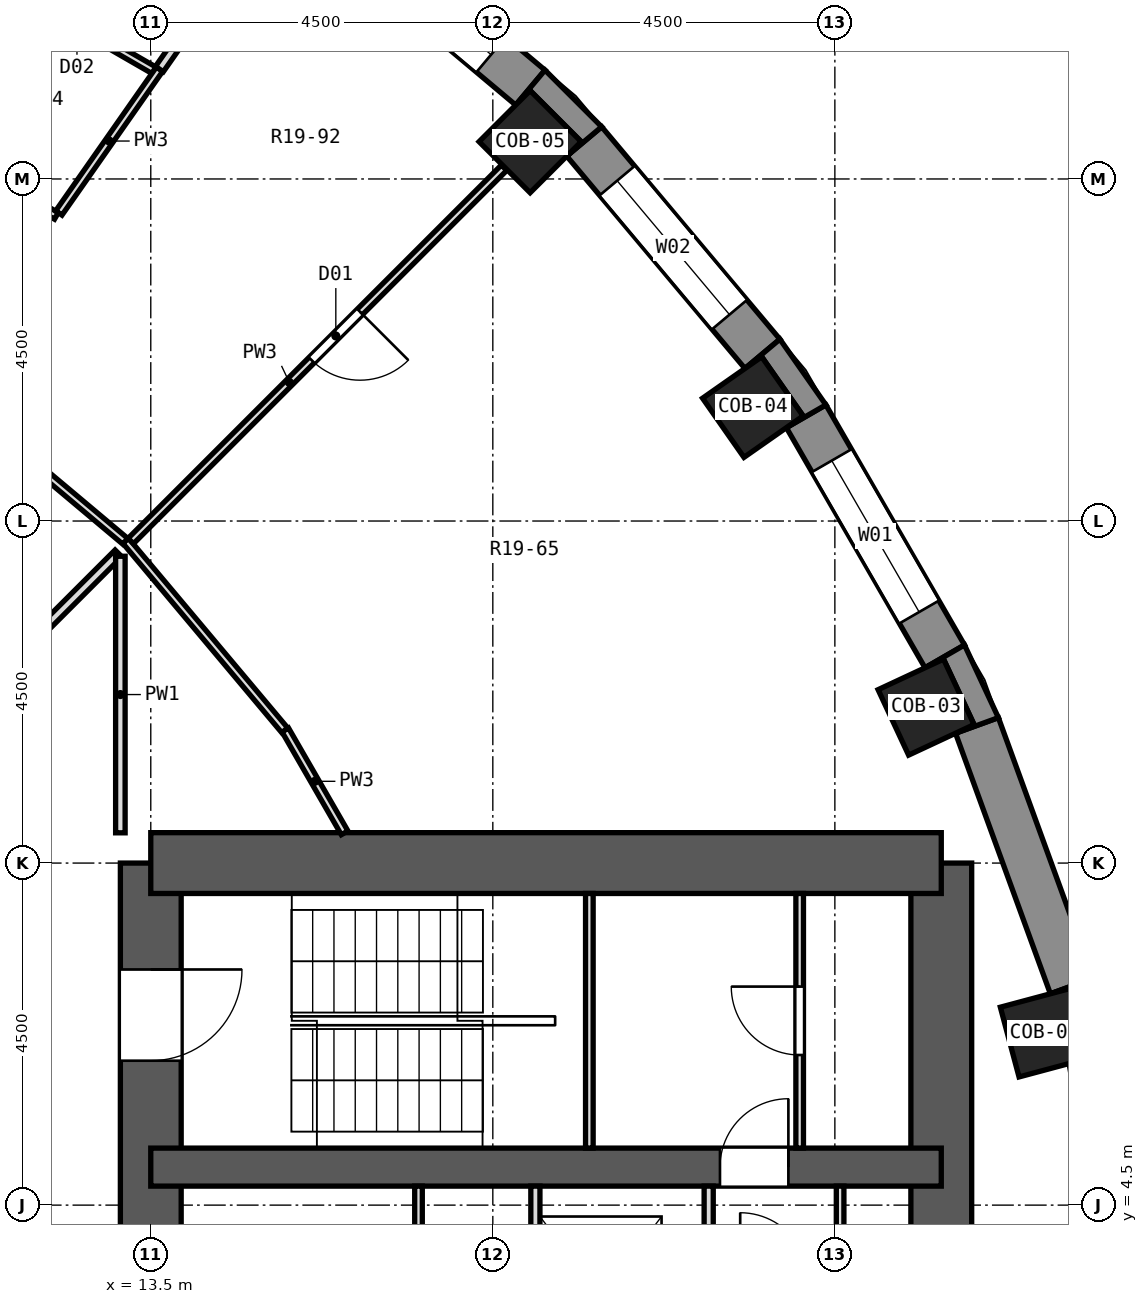
"""IFC4 building model, lengths in metres.
Left out: names, types, materials, properties, quantities, classifications, styles, units other than length and angle.
Written with IfcOpenShell. Run it as: python <this file> out.ifc"""

import sys

from ifc_helpers import new_model, si_unit, direction, frame, frame_2d, origin, origin_2d, place, context, subcontext, project, spatial, polyline, rectangle, outline, extrude, element, fill, save


model = new_model("IFC4")
c1 = context("Model", 3, precision=1e-05, world=origin(), true_north=direction((0.0, 1.0)))
c2 = subcontext(c1, "Body", "Model", "MODEL_VIEW")
j1 = project(units=[si_unit("LENGTHUNIT", "METRE"), si_unit("PLANEANGLEUNIT", "RADIAN")], contexts=[c1])
p1 = place(None, origin())
s1 = spatial("IfcSite", under=j1, at=p1, CompositionType="ELEMENT")
p2 = place(p1, origin())
s2 = spatial("IfcBuilding", under=s1, at=p2, CompositionType="ELEMENT")
p3 = place(p2, frame((0.0, 0.0, 111.7)))
s3 = spatial("IfcBuildingStorey", under=s2, at=p3, CompositionType="ELEMENT", Elevation=111.7)
for number, where, z_axis, x_axis in (
    (1, (25.259, 6.768, 0.0), (0.0, 0.0, 1.0), (0.966, 0.259, 0.0)),
    (2, (23.7, 11.052, 0.0), (0.0, 0.0, 1.0), (0.906, 0.423, 0.0)),
    (3, (21.421, 14.999, 0.0), (0.0, 0.0, 1.0), (0.819, 0.574, 0.0)),
    (4, (18.491, 18.491, 0.0), (0.0, 0.0, 1.0), (0.707, 0.707, 0.0)),
):
    element("IfcColumn", number, at=place(p3, frame(where, z_axis=z_axis, x_axis=x_axis)), inside=s3, PredefinedType="COLUMN", context=c2, shape_type="SweptSolid", body=[
        extrude(rectangle(XDim=0.95, YDim=0.95, at=origin_2d()), origin(), (0.0, 0.0, 1.0), 3.3),
    ])
p4 = place(p3, frame((13.5, -9.0, 0.0), z_axis=(0.0, 0.0, 1.0), x_axis=(0.0, 1.0, 0.0)))
e5 = element("IfcWall", 5, at=p4, inside=s3, PredefinedType="SHEAR", context=c2, shape_type="SweptSolid", body=[
    extrude(rectangle(XDim=18.0, YDim=0.8, at=frame_2d((9.0, 0.0))), origin(), (0.0, 0.0, 1.0), 3.3),
])
p5 = place(p4, frame((15.4, 0.0, 0.0)))
e6 = element("IfcOpeningElement", 6, at=p5, cuts=e5, PredefinedType="OPENING", context=c2, shape_type="SweptSolid", body=[
    extrude(rectangle(XDim=1.2, YDim=2.1, at=frame_2d((0.6, 1.05))), frame((0.0, 0.412, 0.0), z_axis=(0.0, -1.0, 0.0), x_axis=(1.0, 0.0, 0.0)), (0.0, 0.0, 1.0), 0.824),
])
p6 = place(p4, frame((1.4, 0.0, 0.0)))
e7 = element("IfcOpeningElement", 7, at=p6, cuts=e5, PredefinedType="OPENING", context=c2, shape_type="SweptSolid", body=[
    extrude(rectangle(XDim=1.2, YDim=2.1, at=frame_2d((0.6, 1.05))), frame((0.0, 0.412, 0.0), z_axis=(0.0, -1.0, 0.0), x_axis=(1.0, 0.0, 0.0)), (0.0, 0.0, 1.0), 0.824),
])
p7 = place(p4, frame((7.5, 0.0, 0.0)))
e8 = element("IfcOpeningElement", 8, at=p7, cuts=e5, PredefinedType="OPENING", context=c2, shape_type="SweptSolid", body=[
    extrude(rectangle(XDim=3.0, YDim=2.4, at=frame_2d((1.5, 1.2))), frame((0.0, 0.412, 0.0), z_axis=(0.0, -1.0, 0.0), x_axis=(1.0, 0.0, 0.0)), (0.0, 0.0, 1.0), 0.824),
])
p8 = place(p3, frame((23.9, -9.0, 0.0), z_axis=(0.0, 0.0, 1.0), x_axis=(0.0, 1.0, 0.0)))
e9 = element("IfcWall", 9, at=p8, inside=s3, PredefinedType="SHEAR", context=c2, shape_type="SweptSolid", body=[
    extrude(rectangle(XDim=18.0, YDim=0.8, at=frame_2d((9.0, 0.0))), origin(), (0.0, 0.0, 1.0), 3.3),
])
p9 = place(p3, frame((13.5, 9.0, 0.0), z_axis=(0.0, 0.0, 1.0), x_axis=(1.0, 0.0, 0.0)))
e10 = element("IfcWall", 10, at=p9, inside=s3, PredefinedType="SHEAR", context=c2, shape_type="SweptSolid", body=[
    extrude(rectangle(XDim=10.4, YDim=0.8, at=frame_2d((5.2, 0.0))), origin(), (0.0, 0.0, 1.0), 3.3),
])
p10 = place(p3, frame((13.5, 5.0, 0.0), z_axis=(0.0, 0.0, 1.0), x_axis=(1.0, 0.0, 0.0)))
e11 = element("IfcWall", 11, at=p10, inside=s3, PredefinedType="SHEAR", context=c2, shape_type="SweptSolid", body=[
    extrude(rectangle(XDim=10.4, YDim=0.5, at=frame_2d((5.2, 0.0))), origin(), (0.0, 0.0, 1.0), 3.3),
])
p11 = place(p10, frame((7.489, 0.0, 0.0)))
e12 = element("IfcOpeningElement", 12, at=p11, cuts=e11, PredefinedType="OPENING", context=c2, shape_type="SweptSolid", body=[
    extrude(rectangle(XDim=0.9, YDim=2.1, at=frame_2d((0.45, 1.05))), frame((0.0, 0.262, 0.0), z_axis=(0.0, -1.0, 0.0), x_axis=(1.0, 0.0, 0.0)), (0.0, 0.0, 1.0), 0.524),
])
p12 = place(p3, frame((25.617, 7.383, 0.0), z_axis=(0.0, 0.0, 1.0), x_axis=(-0.341990236633, 0.939703505393, 0.0)))
e13 = element("IfcWall", 13, at=p12, inside=s3, PredefinedType="SOLIDWALL", context=c2, shape_type="SweptSolid", body=[
    extrude(rectangle(XDim=3.648, YDim=0.6, at=frame_2d((1.824, 0.0))), origin(), (0.0, 0.0, 1.0), 2.8),
])
p13 = place(p3, frame((23.946, 11.719, 0.0), z_axis=(0.0, 0.0, 1.0), x_axis=(-0.499954196102, 0.866051847062, 0.0)))
e14 = element("IfcWall", 14, at=p13, inside=s3, PredefinedType="SOLIDWALL", context=c2, shape_type="SweptSolid", body=[
    extrude(rectangle(XDim=3.648, YDim=0.6, at=frame_2d((1.824, 0.0))), origin(), (0.0, 0.0, 1.0), 2.8),
])
p14 = place(p13, frame((0.674, 0.0, 0.9)))
e15 = element("IfcOpeningElement", 15, at=p14, cuts=e14, PredefinedType="OPENING", context=c2, shape_type="SweptSolid", body=[
    extrude(rectangle(XDim=2.3, YDim=1.8, at=frame_2d((1.15, 0.9))), frame((0.0, 0.312, 0.0), z_axis=(0.0, -1.0, 0.0), x_axis=(1.0, 0.0, 0.0)), (0.0, 0.0, 1.0), 0.624),
])
p15 = place(p3, frame((21.547, 15.699, 0.0), z_axis=(0.0, 0.0, 1.0), x_axis=(-0.642774476932, 0.766055462616, 0.0)))
e16 = element("IfcWall", 16, at=p15, inside=s3, PredefinedType="SOLIDWALL", context=c2, shape_type="SweptSolid", body=[
    extrude(rectangle(XDim=3.648, YDim=0.6, at=frame_2d((1.824, 0.0))), origin(), (0.0, 0.0, 1.0), 2.8),
])
p16 = place(p15, frame((0.674, 0.0, 0.9)))
e17 = element("IfcOpeningElement", 17, at=p16, cuts=e16, PredefinedType="OPENING", context=c2, shape_type="SweptSolid", body=[
    extrude(rectangle(XDim=2.3, YDim=1.8, at=frame_2d((1.15, 0.9))), frame((0.0, 0.312, 0.0), z_axis=(0.0, -1.0, 0.0), x_axis=(1.0, 0.0, 0.0)), (0.0, 0.0, 1.0), 0.624),
])
p17 = place(p3, frame((18.494, 19.202, 0.0), z_axis=(0.0, 0.0, 1.0), x_axis=(-0.766055462616, 0.642774476932, 0.0)))
e18 = element("IfcWall", 18, at=p17, inside=s3, PredefinedType="SOLIDWALL", context=c2, shape_type="SweptSolid", body=[
    extrude(rectangle(XDim=3.648, YDim=0.6, at=frame_2d((1.824, 0.0))), origin(), (0.0, 0.0, 1.0), 2.8),
])
p18 = place(p17, frame((0.674, 0.0, 0.9)))
e19 = element("IfcOpeningElement", 19, at=p18, cuts=e18, PredefinedType="OPENING", context=c2, shape_type="SweptSolid", body=[
    extrude(rectangle(XDim=2.3, YDim=1.8, at=frame_2d((1.15, 0.9))), frame((0.0, 0.312, 0.0), z_axis=(0.0, -1.0, 0.0), x_axis=(1.0, 0.0, 0.0)), (0.0, 0.0, 1.0), 0.624),
])
p19 = place(p3, origin())
e20 = element("IfcWall", 20, at=p19, inside=s3, PredefinedType="SOLIDWALL", context=c2, shape_type="SweptSolid", body=[
    extrude(outline(polyline([(26.172, 6.467), (25.899, 7.486), (25.335, 7.28), (25.595, 7.35), (25.841, 6.432), (25.581, 6.363), (26.172, 6.467)])), origin(), (0.0, 0.0, 1.0), 2.8),
])
p20 = place(p3, origin())
e21 = element("IfcWall", 21, at=p20, inside=s3, PredefinedType="SOLIDWALL", context=c2, shape_type="SweptSolid", body=[
    extrude(outline(polyline([(24.651, 10.913), (24.206, 11.869), (23.686, 11.569), (23.93, 11.683), (24.331, 10.822), (24.087, 10.708), (24.651, 10.913)])), origin(), (0.0, 0.0, 1.0), 2.8),
])
p21 = place(p3, origin())
e22 = element("IfcWall", 22, at=p21, inside=s3, PredefinedType="SOLIDWALL", context=c2, shape_type="SweptSolid", body=[
    extrude(outline(polyline([(21.777, 15.892), (21.317, 15.506), (21.538, 15.661), (22.083, 14.882), (21.862, 14.728), (22.382, 15.028), (21.777, 15.892)])), origin(), (0.0, 0.0, 1.0), 2.8),
])
p22 = place(p3, origin())
e23 = element("IfcWall", 23, at=p22, inside=s3, PredefinedType="SOLIDWALL", context=c2, shape_type="SweptSolid", body=[
    extrude(outline(polyline([(19.432, 18.686), (18.686, 19.432), (18.301, 18.972), (18.491, 19.163), (19.163, 18.491), (18.972, 18.301), (19.432, 18.686)])), origin(), (0.0, 0.0, 1.0), 2.8),
])
p23 = place(p3, frame((15.269, 10.753, 0.0), z_axis=(0.0, 0.0, 1.0), x_axis=(0.499614353746, -0.866247942296, 0.0)))
e24 = element("IfcWall", 24, at=p23, inside=s3, PredefinedType="PARTITIONING", context=c2, shape_type="SweptSolid", body=[
    extrude(rectangle(XDim=1.564, YDim=0.1, at=frame_2d((0.782, 0.0))), origin(), (0.0, 0.0, 1.0), 2.8),
])
for number, where, z_axis, x_axis in (
    (25, (13.169, 13.241, 0.0), (0.0, 0.0, 1.0), (0.643, -0.766, 0.0)),
    (26, (10.67, 15.327, 0.0), (0.0, 0.0, 1.0), (0.766, -0.643, 0.0)),
):
    element("IfcWall", number, at=place(p3, frame(where, z_axis=z_axis, x_axis=x_axis)), inside=s3, PredefinedType="PARTITIONING", context=c2, shape_type="SweptSolid", body=[
        extrude(rectangle(XDim=3.255, YDim=0.1, at=frame_2d((1.628, 0.0))), origin(), (0.0, 0.0, 1.0), 2.8),
    ])
p24 = place(p3, frame((10.31, 18.64, 0.0), z_axis=(0.0, 0.0, 1.0), x_axis=(0.865856719536, -0.500292055938, 0.0)))
e27 = element("IfcWall", 27, at=p24, inside=s3, PredefinedType="PARTITIONING", context=c2, shape_type="SweptSolid", body=[
    extrude(rectangle(XDim=2.251, YDim=0.1, at=frame_2d((1.125, 0.0))), origin(), (0.0, 0.0, 1.0), 2.8),
])
p25 = place(p3, frame((11.471, 20.625, 0.0), z_axis=(0.0, 0.0, 1.0), x_axis=(0.866161784063, -0.499763707994, 0.0)))
e28 = element("IfcWall", 28, at=p25, inside=s3, PredefinedType="PARTITIONING", context=c2, shape_type="SweptSolid", body=[
    extrude(rectangle(XDim=2.391, YDim=0.1, at=frame_2d((1.195, 0.0))), origin(), (0.0, 0.0, 1.0), 2.8),
])
p26 = place(p25, frame((0.822, 0.0, 0.0)))
e29 = element("IfcOpeningElement", 29, at=p26, cuts=e28, PredefinedType="OPENING", context=c2, shape_type="SweptSolid", body=[
    extrude(rectangle(XDim=0.8, YDim=2.1, at=frame_2d((0.4, 1.05))), frame((0.0, 0.062, 0.0), z_axis=(0.0, -1.0, 0.0), x_axis=(1.0, 0.0, 0.0)), (0.0, 0.0, 1.0), 0.124),
])
p27 = place(p3, frame((13.237, 13.237, 0.0), z_axis=(0.0, 0.0, 1.0), x_axis=(0.707106781187, 0.707106781187, 0.0)))
e30 = element("IfcWall", 30, at=p27, inside=s3, PredefinedType="PARTITIONING", context=c2, shape_type="SweptSolid", body=[
    extrude(rectangle(XDim=6.945, YDim=0.1, at=frame_2d((3.472, 0.0))), origin(), (0.0, 0.0, 1.0), 2.8),
])
p28 = place(p27, frame((3.364, 0.0, 0.0)))
e31 = element("IfcOpeningElement", 31, at=p28, cuts=e30, PredefinedType="OPENING", context=c2, shape_type="SweptSolid", body=[
    extrude(rectangle(XDim=0.9, YDim=2.1, at=frame_2d((0.45, 1.05))), frame((0.0, 0.062, 0.0), z_axis=(0.0, -1.0, 0.0), x_axis=(1.0, 0.0, 0.0)), (0.0, 0.0, 1.0), 0.124),
])
p29 = place(p3, frame((7.71, 7.71, 0.0), z_axis=(0.0, 0.0, 1.0), x_axis=(0.707106781187, 0.707106781187, 0.0)))
e32 = element("IfcWall", 32, at=p29, inside=s3, PredefinedType="PARTITIONING", context=c2, shape_type="SweptSolid", body=[
    extrude(rectangle(XDim=7.587, YDim=0.125, at=frame_2d((3.793, 0.0))), origin(), (0.0, 0.0, 1.0), 2.8),
])
p30 = place(p3, frame((12.291, 17.553, 0.0), z_axis=(0.0, 0.0, 1.0), x_axis=(0.573582946976, 0.819147485462, 0.0)))
e33 = element("IfcWall", 33, at=p30, inside=s3, PredefinedType="PARTITIONING", context=c2, shape_type="SweptSolid", body=[
    extrude(rectangle(XDim=2.31, YDim=0.1, at=frame_2d((1.155, 0.0))), origin(), (0.0, 0.0, 1.0), 2.8),
])
p31 = place(p3, frame((13.614, 19.446, 0.0), z_axis=(0.0, 0.0, 1.0), x_axis=(0.573470846205, 0.819225969164, 0.0)))
e34 = element("IfcWall", 34, at=p31, inside=s3, PredefinedType="PARTITIONING", context=c2, shape_type="SweptSolid", body=[
    extrude(rectangle(XDim=1.927, YDim=0.125, at=frame_2d((0.964, 0.0))), origin(), (0.0, 0.0, 1.0), 2.8),
])
p32 = place(p3, frame((13.1, 9.398, 0.0), z_axis=(0.0, 0.0, 1.0), x_axis=(0.0, 1.0, 0.0)))
e35 = element("IfcWall", 35, at=p32, inside=s3, PredefinedType="PARTITIONING", context=c2, shape_type="SweptSolid", body=[
    extrude(rectangle(XDim=3.639, YDim=0.125, at=frame_2d((1.819, 0.0))), origin(), (0.0, 0.0, 1.0), 2.8),
])
p33 = place(p3, frame((17.022, 2.25, 0.0), z_axis=(0.0, 0.0, 1.0), x_axis=(0.0, 1.0, 0.0)))
e36 = element("IfcWall", 36, at=p33, inside=s3, PredefinedType="PARTITIONING", context=c2, shape_type="SweptSolid", body=[
    extrude(rectangle(XDim=2.5, YDim=0.1, at=frame_2d((1.25, 0.0))), origin(), (0.0, 0.0, 1.0), 2.8),
])
for number, where, z_axis, x_axis in (
    (37, (18.56, 2.25, 0.0), (0.0, 0.0, 1.0), (0.0, 1.0, 0.0)),
    (38, (20.84, 2.25, 0.0), (0.0, 0.0, 1.0), (0.0, 1.0, 0.0)),
):
    element("IfcWall", number, at=place(p3, frame(where, z_axis=z_axis, x_axis=x_axis)), inside=s3, PredefinedType="PARTITIONING", context=c2, shape_type="SweptSolid", body=[
        extrude(rectangle(XDim=2.5, YDim=0.12, at=frame_2d((1.25, 0.0))), origin(), (0.0, 0.0, 1.0), 2.8),
    ])
p34 = place(p3, frame((22.569, 2.25, 0.0), z_axis=(0.0, 0.0, 1.0), x_axis=(0.0, 1.0, 0.0)))
e39 = element("IfcWall", 39, at=p34, inside=s3, PredefinedType="PARTITIONING", context=c2, shape_type="SweptSolid", body=[
    extrude(rectangle(XDim=2.5, YDim=0.1, at=frame_2d((1.25, 0.0))), origin(), (0.0, 0.0, 1.0), 2.8),
])
p35 = place(p3, frame((19.27, 5.25, 0.0), z_axis=(0.0, 0.0, 1.0), x_axis=(0.0, 1.0, 0.0)))
e40 = element("IfcWall", 40, at=p35, inside=s3, PredefinedType="PARTITIONING", context=c2, shape_type="SweptSolid", body=[
    extrude(rectangle(XDim=3.35, YDim=0.1, at=frame_2d((1.675, 0.0))), origin(), (0.0, 0.0, 1.0), 2.8),
])
p36 = place(p3, frame((22.037, 5.25, 0.0), z_axis=(0.0, 0.0, 1.0), x_axis=(0.0, 1.0, 0.0)))
e41 = element("IfcWall", 41, at=p36, inside=s3, PredefinedType="PARTITIONING", context=c2, shape_type="SweptSolid", body=[
    extrude(rectangle(XDim=3.35, YDim=0.1, at=frame_2d((1.675, 0.0))), origin(), (0.0, 0.0, 1.0), 2.8),
])
p37 = place(p36, frame((1.225, 0.0, 0.0)))
e42 = element("IfcOpeningElement", 42, at=p37, cuts=e41, PredefinedType="OPENING", context=c2, shape_type="SweptSolid", body=[
    extrude(rectangle(XDim=0.9, YDim=2.1, at=frame_2d((0.45, 1.05))), frame((0.0, 0.062, 0.0), z_axis=(0.0, -1.0, 0.0), x_axis=(1.0, 0.0, 0.0)), (0.0, 0.0, 1.0), 0.124),
])
p38 = place(p14, origin())
e43 = element("IfcWindow", 43, at=p38, inside=s3, PartitioningType="SINGLE_PANEL", PredefinedType="WINDOW", context=c2, shape_type="SweptSolid", body=[
    extrude(rectangle(XDim=2.3, YDim=1.8, at=frame_2d((1.15, 0.9))), frame((0.0, 0.18, 0.0), z_axis=(0.0, -1.0, 0.0), x_axis=(1.0, 0.0, 0.0)), (0.0, 0.0, 1.0), 0.06),
])
fill(e15, e43)
p39 = place(p16, origin())
e44 = element("IfcWindow", 44, at=p39, inside=s3, PartitioningType="SINGLE_PANEL", PredefinedType="WINDOW", context=c2, shape_type="SweptSolid", body=[
    extrude(rectangle(XDim=2.3, YDim=1.8, at=frame_2d((1.15, 0.9))), frame((0.0, 0.18, 0.0), z_axis=(0.0, -1.0, 0.0), x_axis=(1.0, 0.0, 0.0)), (0.0, 0.0, 1.0), 0.06),
])
fill(e17, e44)
p40 = place(p18, origin())
e45 = element("IfcWindow", 45, at=p40, inside=s3, PartitioningType="SINGLE_PANEL", PredefinedType="WINDOW", context=c2, shape_type="SweptSolid", body=[
    extrude(rectangle(XDim=2.3, YDim=1.8, at=frame_2d((1.15, 0.9))), frame((0.0, 0.18, 0.0), z_axis=(0.0, -1.0, 0.0), x_axis=(1.0, 0.0, 0.0)), (0.0, 0.0, 1.0), 0.06),
])
fill(e19, e45)
p41 = place(p28, frame((0.9, 0.0, 0.0), z_axis=(0.0, 0.0, 1.0), x_axis=(-1.0, 0.0, 0.0)))
e46 = element("IfcDoor", 46, at=p41, inside=s3, OperationType="SINGLE_SWING_LEFT", PredefinedType="DOOR", context=c2, shape_type="SweptSolid", body=[
    extrude(rectangle(XDim=0.9, YDim=2.1, at=frame_2d((0.45, 1.05))), frame((0.0, 0.025, 0.0), z_axis=(0.0, -1.0, 0.0), x_axis=(1.0, 0.0, 0.0)), (0.0, 0.0, 1.0), 0.05),
])
fill(e31, e46)
p42 = place(p37, origin())
e47 = element("IfcDoor", 47, at=p42, inside=s3, OperationType="SINGLE_SWING_RIGHT", PredefinedType="DOOR", context=c2, shape_type="SweptSolid", body=[
    extrude(rectangle(XDim=0.9, YDim=2.1, at=frame_2d((0.45, 1.05))), frame((0.0, 0.025, 0.0), z_axis=(0.0, -1.0, 0.0), x_axis=(1.0, 0.0, 0.0)), (0.0, 0.0, 1.0), 0.05),
])
fill(e42, e47)
p43 = place(p11, origin())
e48 = element("IfcDoor", 48, at=p43, inside=s3, OperationType="SINGLE_SWING_RIGHT", PredefinedType="DOOR", context=c2, shape_type="SweptSolid", body=[
    extrude(rectangle(XDim=0.9, YDim=2.1, at=frame_2d((0.45, 1.05))), frame((0.0, 0.025, 0.0), z_axis=(0.0, -1.0, 0.0), x_axis=(1.0, 0.0, 0.0)), (0.0, 0.0, 1.0), 0.05),
])
fill(e12, e48)
p44 = place(p5, frame((1.2, 0.0, 0.0), z_axis=(0.0, 0.0, 1.0), x_axis=(-1.0, 0.0, 0.0)))
e49 = element("IfcDoor", 49, at=p44, inside=s3, OperationType="SINGLE_SWING_LEFT", PredefinedType="DOOR", context=c2, shape_type="SweptSolid", body=[
    extrude(rectangle(XDim=1.2, YDim=2.1, at=frame_2d((0.6, 1.05))), frame((0.0, 0.025, 0.0), z_axis=(0.0, -1.0, 0.0), x_axis=(1.0, 0.0, 0.0)), (0.0, 0.0, 1.0), 0.05),
])
fill(e6, e49)
save(model, sys.argv[1])
